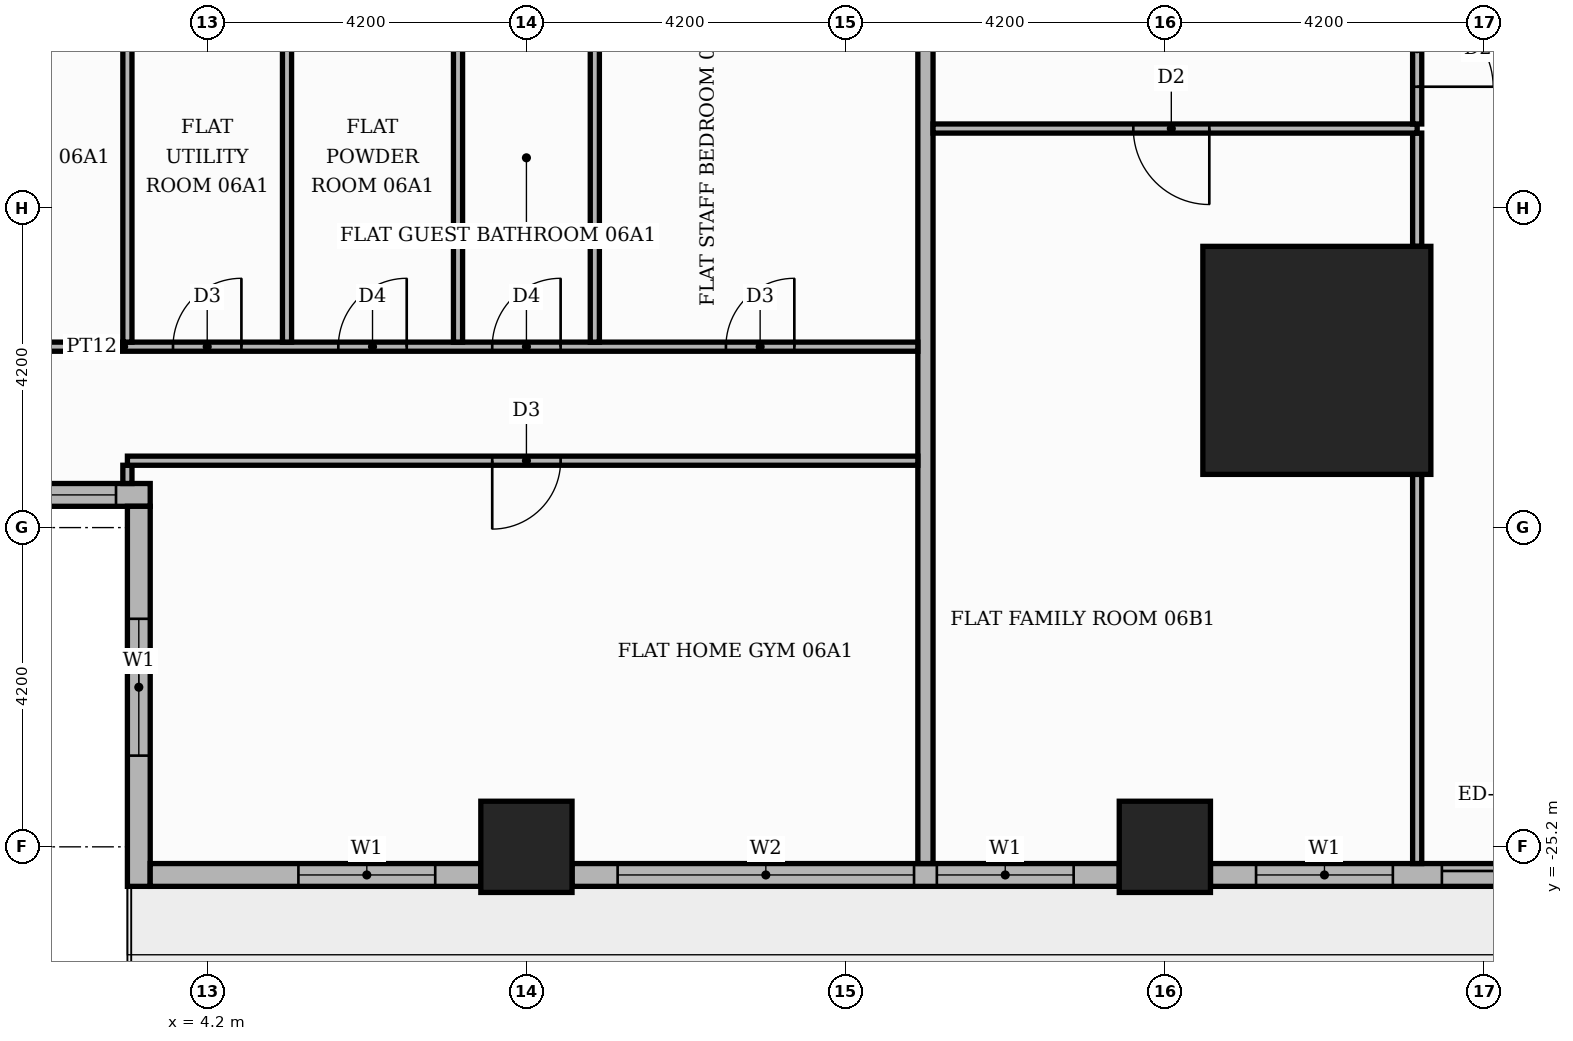
"""IFC4 building model, lengths in metres.
Left out: names, types, materials, properties, quantities, classifications, styles, units other than length and angle.
Written with IfcOpenShell. Run it as: python <this file> out.ifc"""

import sys

from ifc_helpers import new_model, si_unit, direction, frame, frame_2d, origin, origin_2d, place, context, subcontext, project, spatial, rectangle, extrude, element, fill, save


model = new_model("IFC4")
c1 = context("Model", 3, precision=1e-05, world=origin(), true_north=direction((0.0, 1.0)))
c2 = subcontext(c1, "Body", "Model", "MODEL_VIEW")
j1 = project(units=[si_unit("LENGTHUNIT", "METRE"), si_unit("PLANEANGLEUNIT", "RADIAN")], contexts=[c1])
p1 = place(None, origin())
s1 = spatial("IfcSite", under=j1, at=p1, CompositionType="ELEMENT")
p2 = place(p1, origin())
s2 = spatial("IfcBuilding", under=s1, at=p2, CompositionType="ELEMENT")
p3 = place(p2, frame((0.0, 0.0, 30.9)))
s3 = spatial("IfcBuildingStorey", under=s2, at=p3, CompositionType="ELEMENT", Elevation=30.9)
p4 = place(p3, frame((18.8, -18.8, 0.0), z_axis=(0.0, 0.0, 1.0), x_axis=(1.0, 0.0, 0.0)))
e1 = element("IfcColumn", 1, at=p4, inside=s3, PredefinedType="COLUMN", context=c2, shape_type="SweptSolid", body=[
    extrude(rectangle(XDim=3.0, YDim=3.0, at=origin_2d()), origin(), (0.0, 0.0, 1.0), 3.9),
])
for number, where, z_axis, x_axis in (
    (2, (8.4, -25.2, 0.0), (0.0, 0.0, 1.0), (1.0, 0.0, 0.0)),
    (3, (16.8, -25.2, 0.0), (0.0, 0.0, 1.0), (1.0, 0.0, 0.0)),
):
    element("IfcColumn", number, at=place(p3, frame(where, z_axis=z_axis, x_axis=x_axis)), inside=s3, PredefinedType="COLUMN", context=c2, shape_type="SweptSolid", body=[
        extrude(rectangle(XDim=1.2, YDim=1.2, at=origin_2d()), origin(), (0.0, 0.0, 1.0), 3.9),
    ])
p5 = place(p3, frame((-3.15, -20.57, 0.0), z_axis=(0.0, 0.0, 1.0), x_axis=(1.0, 0.0, 0.0)))
e4 = element("IfcWall", 4, at=p5, inside=s3, PredefinedType="STANDARD", context=c2, shape_type="SweptSolid", body=[
    extrude(rectangle(XDim=6.6, YDim=0.3, at=frame_2d((3.3, 0.0))), origin(), (0.0, 0.0, 1.0), 3.48),
])
p6 = place(p5, frame((0.15, 0.0, 0.9)))
e5 = element("IfcOpeningElement", 5, at=p6, cuts=e4, PredefinedType="OPENING", context=c2, shape_type="SweptSolid", body=[
    extrude(rectangle(XDim=6.0, YDim=2.1, at=frame_2d((3.0, 1.05))), frame((0.0, 0.16, 0.0), z_axis=(0.0, -1.0, 0.0), x_axis=(1.0, 0.0, 0.0)), (0.0, 0.0, 1.0), 0.32),
])
p7 = place(p3, frame((3.3, -20.72, 0.0), z_axis=(0.0, 0.0, 1.0), x_axis=(0.0, -1.0, 0.0)))
e6 = element("IfcWall", 6, at=p7, inside=s3, PredefinedType="STANDARD", context=c2, shape_type="SweptSolid", body=[
    extrude(rectangle(XDim=5.0, YDim=0.3, at=frame_2d((2.5, 0.0))), origin(), (0.0, 0.0, 1.0), 3.48),
])
p8 = place(p7, frame((1.48, 0.0, 0.9)))
e7 = element("IfcOpeningElement", 7, at=p8, cuts=e6, PredefinedType="OPENING", context=c2, shape_type="SweptSolid", body=[
    extrude(rectangle(XDim=1.8, YDim=2.1, at=frame_2d((0.9, 1.05))), frame((0.0, 0.16, 0.0), z_axis=(0.0, -1.0, 0.0), x_axis=(1.0, 0.0, 0.0)), (0.0, 0.0, 1.0), 0.32),
])
p9 = place(p3, frame((3.45, -25.57, 0.0), z_axis=(0.0, 0.0, 1.0), x_axis=(1.0, 0.0, 0.0)))
e8 = element("IfcWall", 8, at=p9, inside=s3, PredefinedType="STANDARD", context=c2, shape_type="SweptSolid", body=[
    extrude(rectangle(XDim=4.35, YDim=0.3, at=frame_2d((2.175, 0.0))), origin(), (0.0, 0.0, 1.0), 3.48),
])
p10 = place(p9, frame((1.95, 0.0, 0.9)))
e9 = element("IfcOpeningElement", 9, at=p10, cuts=e8, PredefinedType="OPENING", context=c2, shape_type="SweptSolid", body=[
    extrude(rectangle(XDim=1.8, YDim=2.1, at=frame_2d((0.9, 1.05))), frame((0.0, 0.16, 0.0), z_axis=(0.0, -1.0, 0.0), x_axis=(1.0, 0.0, 0.0)), (0.0, 0.0, 1.0), 0.32),
])
p11 = place(p3, frame((9.0, -25.57, 0.0), z_axis=(0.0, 0.0, 1.0), x_axis=(1.0, 0.0, 0.0)))
e10 = element("IfcWall", 10, at=p11, inside=s3, PredefinedType="STANDARD", context=c2, shape_type="SweptSolid", body=[
    extrude(rectangle(XDim=7.2, YDim=0.3, at=frame_2d((3.6, 0.0))), origin(), (0.0, 0.0, 1.0), 3.48),
])
p12 = place(p11, frame((0.6, 0.0, 0.9)))
e11 = element("IfcOpeningElement", 11, at=p12, cuts=e10, PredefinedType="OPENING", context=c2, shape_type="SweptSolid", body=[
    extrude(rectangle(XDim=3.9, YDim=2.1, at=frame_2d((1.95, 1.05))), frame((0.0, 0.16, 0.0), z_axis=(0.0, -1.0, 0.0), x_axis=(1.0, 0.0, 0.0)), (0.0, 0.0, 1.0), 0.32),
])
p13 = place(p11, frame((4.8, 0.0, 0.9)))
e12 = element("IfcOpeningElement", 12, at=p13, cuts=e10, PredefinedType="OPENING", context=c2, shape_type="SweptSolid", body=[
    extrude(rectangle(XDim=1.8, YDim=2.1, at=frame_2d((0.9, 1.05))), frame((0.0, 0.16, 0.0), z_axis=(0.0, -1.0, 0.0), x_axis=(1.0, 0.0, 0.0)), (0.0, 0.0, 1.0), 0.32),
])
p14 = place(p3, frame((17.4, -25.57, 0.0), z_axis=(0.0, 0.0, 1.0), x_axis=(1.0, 0.0, 0.0)))
e13 = element("IfcWall", 13, at=p14, inside=s3, PredefinedType="STANDARD", context=c2, shape_type="SweptSolid", body=[
    extrude(rectangle(XDim=5.32, YDim=0.3, at=frame_2d((2.66, 0.0))), origin(), (0.0, 0.0, 1.0), 3.48),
])
p15 = place(p14, frame((0.6, 0.0, 0.9)))
e14 = element("IfcOpeningElement", 14, at=p15, cuts=e13, PredefinedType="OPENING", context=c2, shape_type="SweptSolid", body=[
    extrude(rectangle(XDim=1.8, YDim=2.1, at=frame_2d((0.9, 1.05))), frame((0.0, 0.16, 0.0), z_axis=(0.0, -1.0, 0.0), x_axis=(1.0, 0.0, 0.0)), (0.0, 0.0, 1.0), 0.32),
])
p16 = place(p14, frame((3.045, 0.0, 0.0)))
e15 = element("IfcOpeningElement", 15, at=p16, cuts=e13, PredefinedType="OPENING", context=c2, shape_type="SweptSolid", body=[
    extrude(rectangle(XDim=1.8, YDim=2.4, at=frame_2d((0.9, 1.2))), frame((0.0, 0.16, 0.0), z_axis=(0.0, -1.0, 0.0), x_axis=(1.0, 0.0, 0.0)), (0.0, 0.0, 1.0), 0.32),
])
p17 = place(p3, frame((13.65, -25.42, 0.0), z_axis=(0.0, 0.0, 1.0), x_axis=(0.0, 1.0, 0.0)))
e16 = element("IfcWall", 16, at=p17, inside=s3, PredefinedType="PARTITIONING", context=c2, shape_type="SweptSolid", body=[
    extrude(rectangle(XDim=11.67, YDim=0.2, at=frame_2d((5.835, 0.0))), origin(), (0.0, 0.0, 1.0), 3.48),
])
p18 = place(p3, frame((20.12, -25.42, 0.0), z_axis=(0.0, 0.0, 1.0), x_axis=(0.0, 1.0, 0.0)))
e17 = element("IfcWall", 17, at=p18, inside=s3, PredefinedType="PARTITIONING", context=c2, shape_type="SweptSolid", body=[
    extrude(rectangle(XDim=5.12, YDim=0.12, at=frame_2d((2.56, 0.0))), origin(), (0.0, 0.0, 1.0), 3.48),
])
p19 = place(p3, frame((3.15, -20.42, 0.0), z_axis=(0.0, 0.0, 1.0), x_axis=(0.0, 1.0, 0.0)))
e18 = element("IfcWall", 18, at=p19, inside=s3, PredefinedType="PARTITIONING", context=c2, shape_type="SweptSolid", body=[
    extrude(rectangle(XDim=0.24, YDim=0.12, at=frame_2d((0.12, 0.0))), origin(), (0.0, 0.0, 1.0), 3.48),
])
p20 = place(p3, frame((3.15, -20.12, 0.0), z_axis=(0.0, 0.0, 1.0), x_axis=(1.0, 0.0, 0.0)))
e19 = element("IfcWall", 19, at=p20, inside=s3, PredefinedType="PARTITIONING", context=c2, shape_type="SweptSolid", body=[
    extrude(rectangle(XDim=10.4, YDim=0.12, at=frame_2d((5.2, 0.0))), origin(), (0.0, 0.0, 1.0), 3.48),
])
p21 = place(p20, frame((4.8, 0.0, 0.0)))
e20 = element("IfcOpeningElement", 20, at=p21, cuts=e19, PredefinedType="OPENING", context=c2, shape_type="SweptSolid", body=[
    extrude(rectangle(XDim=0.9, YDim=2.1, at=frame_2d((0.45, 1.05))), frame((0.0, 0.07, 0.0), z_axis=(0.0, -1.0, 0.0), x_axis=(1.0, 0.0, 0.0)), (0.0, 0.0, 1.0), 0.14),
])
p22 = place(p3, frame((-7.35, -18.62, 0.0), z_axis=(0.0, 0.0, 1.0), x_axis=(1.0, 0.0, 0.0)))
e21 = element("IfcWall", 21, at=p22, inside=s3, PredefinedType="PARTITIONING", context=c2, shape_type="SweptSolid", body=[
    extrude(rectangle(XDim=20.9, YDim=0.12, at=frame_2d((10.45, 0.0))), origin(), (0.0, 0.0, 1.0), 3.48),
])
p23 = place(p22, frame((2.7, 0.0, 0.0)))
e22 = element("IfcOpeningElement", 22, at=p23, cuts=e21, PredefinedType="OPENING", context=c2, shape_type="SweptSolid", body=[
    extrude(rectangle(XDim=0.9, YDim=2.1, at=frame_2d((0.45, 1.05))), frame((0.0, 0.07, 0.0), z_axis=(0.0, -1.0, 0.0), x_axis=(1.0, 0.0, 0.0)), (0.0, 0.0, 1.0), 0.14),
])
p24 = place(p22, frame((7.95, 0.0, 0.0)))
e23 = element("IfcOpeningElement", 23, at=p24, cuts=e21, PredefinedType="OPENING", context=c2, shape_type="SweptSolid", body=[
    extrude(rectangle(XDim=0.9, YDim=2.1, at=frame_2d((0.45, 1.05))), frame((0.0, 0.07, 0.0), z_axis=(0.0, -1.0, 0.0), x_axis=(1.0, 0.0, 0.0)), (0.0, 0.0, 1.0), 0.14),
])
p25 = place(p22, frame((11.1, 0.0, 0.0)))
e24 = element("IfcOpeningElement", 24, at=p25, cuts=e21, PredefinedType="OPENING", context=c2, shape_type="SweptSolid", body=[
    extrude(rectangle(XDim=0.9, YDim=2.1, at=frame_2d((0.45, 1.05))), frame((0.0, 0.07, 0.0), z_axis=(0.0, -1.0, 0.0), x_axis=(1.0, 0.0, 0.0)), (0.0, 0.0, 1.0), 0.14),
])
p26 = place(p22, frame((13.275, 0.0, 0.0)))
e25 = element("IfcOpeningElement", 25, at=p26, cuts=e21, PredefinedType="OPENING", context=c2, shape_type="SweptSolid", body=[
    extrude(rectangle(XDim=0.9, YDim=2.1, at=frame_2d((0.45, 1.05))), frame((0.0, 0.07, 0.0), z_axis=(0.0, -1.0, 0.0), x_axis=(1.0, 0.0, 0.0)), (0.0, 0.0, 1.0), 0.14),
])
p27 = place(p22, frame((15.3, 0.0, 0.0)))
e26 = element("IfcOpeningElement", 26, at=p27, cuts=e21, PredefinedType="OPENING", context=c2, shape_type="SweptSolid", body=[
    extrude(rectangle(XDim=0.9, YDim=2.1, at=frame_2d((0.45, 1.05))), frame((0.0, 0.07, 0.0), z_axis=(0.0, -1.0, 0.0), x_axis=(1.0, 0.0, 0.0)), (0.0, 0.0, 1.0), 0.14),
])
p28 = place(p22, frame((18.375, 0.0, 0.0)))
e27 = element("IfcOpeningElement", 27, at=p28, cuts=e21, PredefinedType="OPENING", context=c2, shape_type="SweptSolid", body=[
    extrude(rectangle(XDim=0.9, YDim=2.1, at=frame_2d((0.45, 1.05))), frame((0.0, 0.07, 0.0), z_axis=(0.0, -1.0, 0.0), x_axis=(1.0, 0.0, 0.0)), (0.0, 0.0, 1.0), 0.14),
])
for number, where, z_axis, x_axis in (
    (28, (3.15, -18.56, 0.0), (0.0, 0.0, 1.0), (0.0, 1.0, 0.0)),
    (29, (5.25, -18.56, 0.0), (0.0, 0.0, 1.0), (0.0, 1.0, 0.0)),
    (30, (7.5, -18.56, 0.0), (0.0, 0.0, 1.0), (0.0, 1.0, 0.0)),
    (31, (9.3, -18.56, 0.0), (0.0, 0.0, 1.0), (0.0, 1.0, 0.0)),
):
    element("IfcWall", number, at=place(p3, frame(where, z_axis=z_axis, x_axis=x_axis)), inside=s3, PredefinedType="PARTITIONING", context=c2, shape_type="SweptSolid", body=[
        extrude(rectangle(XDim=4.81, YDim=0.12, at=frame_2d((2.405, 0.0))), origin(), (0.0, 0.0, 1.0), 3.48),
    ])
p29 = place(p3, frame((20.12, -17.3, 0.0), z_axis=(0.0, 0.0, 1.0), x_axis=(0.0, 1.0, 0.0)))
e32 = element("IfcWall", 32, at=p29, inside=s3, PredefinedType="PARTITIONING", context=c2, shape_type="SweptSolid", body=[
    extrude(rectangle(XDim=1.49, YDim=0.12, at=frame_2d((0.745, 0.0))), origin(), (0.0, 0.0, 1.0), 3.48),
])
p30 = place(p3, frame((13.75, -15.75, 0.0), z_axis=(0.0, 0.0, 1.0), x_axis=(1.0, 0.0, 0.0)))
e33 = element("IfcWall", 33, at=p30, inside=s3, PredefinedType="PARTITIONING", context=c2, shape_type="SweptSolid", body=[
    extrude(rectangle(XDim=6.37, YDim=0.12, at=frame_2d((3.185, 0.0))), origin(), (0.0, 0.0, 1.0), 3.48),
])
p31 = place(p30, frame((2.635, 0.0, 0.0)))
e34 = element("IfcOpeningElement", 34, at=p31, cuts=e33, PredefinedType="OPENING", context=c2, shape_type="SweptSolid", body=[
    extrude(rectangle(XDim=1.0, YDim=2.1, at=frame_2d((0.5, 1.05))), frame((0.0, 0.07, 0.0), z_axis=(0.0, -1.0, 0.0), x_axis=(1.0, 0.0, 0.0)), (0.0, 0.0, 1.0), 0.14),
])
p32 = place(p3, frame((20.12, -15.69, 0.0), z_axis=(0.0, 0.0, 1.0), x_axis=(0.0, 1.0, 0.0)))
e35 = element("IfcWall", 35, at=p32, inside=s3, PredefinedType="PARTITIONING", context=c2, shape_type="SweptSolid", body=[
    extrude(rectangle(XDim=1.98, YDim=0.12, at=frame_2d((0.99, 0.0))), origin(), (0.0, 0.0, 1.0), 3.48),
])
p33 = place(p32, frame((0.49, 0.0, 0.0)))
e36 = element("IfcOpeningElement", 36, at=p33, cuts=e35, PredefinedType="OPENING", context=c2, shape_type="SweptSolid", body=[
    extrude(rectangle(XDim=1.0, YDim=2.1, at=frame_2d((0.5, 1.05))), frame((0.0, 0.07, 0.0), z_axis=(0.0, -1.0, 0.0), x_axis=(1.0, 0.0, 0.0)), (0.0, 0.0, 1.0), 0.14),
])
p34 = place(p6, origin())
e37 = element("IfcWindow", 37, at=p34, inside=s3, PartitioningType="SINGLE_PANEL", PredefinedType="WINDOW", context=c2, shape_type="SweptSolid", body=[
    extrude(rectangle(XDim=6.0, YDim=2.1, at=frame_2d((3.0, 1.05))), frame((0.0, 0.03, 0.0), z_axis=(0.0, -1.0, 0.0), x_axis=(1.0, 0.0, 0.0)), (0.0, 0.0, 1.0), 0.06),
])
fill(e5, e37)
p35 = place(p8, origin())
e38 = element("IfcWindow", 38, at=p35, inside=s3, PartitioningType="SINGLE_PANEL", PredefinedType="WINDOW", context=c2, shape_type="SweptSolid", body=[
    extrude(rectangle(XDim=1.8, YDim=2.1, at=frame_2d((0.9, 1.05))), frame((0.0, 0.03, 0.0), z_axis=(0.0, -1.0, 0.0), x_axis=(1.0, 0.0, 0.0)), (0.0, 0.0, 1.0), 0.06),
])
fill(e7, e38)
p36 = place(p10, origin())
e39 = element("IfcWindow", 39, at=p36, inside=s3, PartitioningType="SINGLE_PANEL", PredefinedType="WINDOW", context=c2, shape_type="SweptSolid", body=[
    extrude(rectangle(XDim=1.8, YDim=2.1, at=frame_2d((0.9, 1.05))), frame((0.0, 0.03, 0.0), z_axis=(0.0, -1.0, 0.0), x_axis=(1.0, 0.0, 0.0)), (0.0, 0.0, 1.0), 0.06),
])
fill(e9, e39)
p37 = place(p12, origin())
e40 = element("IfcWindow", 40, at=p37, inside=s3, PartitioningType="SINGLE_PANEL", PredefinedType="WINDOW", context=c2, shape_type="SweptSolid", body=[
    extrude(rectangle(XDim=3.9, YDim=2.1, at=frame_2d((1.95, 1.05))), frame((0.0, 0.03, 0.0), z_axis=(0.0, -1.0, 0.0), x_axis=(1.0, 0.0, 0.0)), (0.0, 0.0, 1.0), 0.06),
])
fill(e11, e40)
p38 = place(p13, origin())
e41 = element("IfcWindow", 41, at=p38, inside=s3, PartitioningType="SINGLE_PANEL", PredefinedType="WINDOW", context=c2, shape_type="SweptSolid", body=[
    extrude(rectangle(XDim=1.8, YDim=2.1, at=frame_2d((0.9, 1.05))), frame((0.0, 0.03, 0.0), z_axis=(0.0, -1.0, 0.0), x_axis=(1.0, 0.0, 0.0)), (0.0, 0.0, 1.0), 0.06),
])
fill(e12, e41)
p39 = place(p15, origin())
e42 = element("IfcWindow", 42, at=p39, inside=s3, PartitioningType="SINGLE_PANEL", PredefinedType="WINDOW", context=c2, shape_type="SweptSolid", body=[
    extrude(rectangle(XDim=1.8, YDim=2.1, at=frame_2d((0.9, 1.05))), frame((0.0, 0.03, 0.0), z_axis=(0.0, -1.0, 0.0), x_axis=(1.0, 0.0, 0.0)), (0.0, 0.0, 1.0), 0.06),
])
fill(e14, e42)
p40 = place(p16, origin())
e43 = element("IfcDoor", 43, at=p40, inside=s3, OperationType="SLIDING_TO_RIGHT", PredefinedType="DOOR", context=c2, shape_type="SweptSolid", body=[
    extrude(rectangle(XDim=1.8, YDim=2.4, at=frame_2d((0.9, 1.2))), frame((0.0, 0.025, 0.0), z_axis=(0.0, -1.0, 0.0), x_axis=(1.0, 0.0, 0.0)), (0.0, 0.0, 1.0), 0.05),
])
fill(e15, e43)
p41 = place(p25, origin())
e44 = element("IfcDoor", 44, at=p41, inside=s3, OperationType="SINGLE_SWING_RIGHT", PredefinedType="DOOR", context=c2, shape_type="SweptSolid", body=[
    extrude(rectangle(XDim=0.9, YDim=2.1, at=frame_2d((0.45, 1.05))), frame((0.0, 0.025, 0.0), z_axis=(0.0, -1.0, 0.0), x_axis=(1.0, 0.0, 0.0)), (0.0, 0.0, 1.0), 0.05),
])
fill(e24, e44)
p42 = place(p26, origin())
e45 = element("IfcDoor", 45, at=p42, inside=s3, OperationType="SINGLE_SWING_RIGHT", PredefinedType="DOOR", context=c2, shape_type="SweptSolid", body=[
    extrude(rectangle(XDim=0.9, YDim=2.1, at=frame_2d((0.45, 1.05))), frame((0.0, 0.025, 0.0), z_axis=(0.0, -1.0, 0.0), x_axis=(1.0, 0.0, 0.0)), (0.0, 0.0, 1.0), 0.05),
])
fill(e25, e45)
p43 = place(p27, origin())
e46 = element("IfcDoor", 46, at=p43, inside=s3, OperationType="SINGLE_SWING_RIGHT", PredefinedType="DOOR", context=c2, shape_type="SweptSolid", body=[
    extrude(rectangle(XDim=0.9, YDim=2.1, at=frame_2d((0.45, 1.05))), frame((0.0, 0.025, 0.0), z_axis=(0.0, -1.0, 0.0), x_axis=(1.0, 0.0, 0.0)), (0.0, 0.0, 1.0), 0.05),
])
fill(e26, e46)
p44 = place(p28, origin())
e47 = element("IfcDoor", 47, at=p44, inside=s3, OperationType="SINGLE_SWING_RIGHT", PredefinedType="DOOR", context=c2, shape_type="SweptSolid", body=[
    extrude(rectangle(XDim=0.9, YDim=2.1, at=frame_2d((0.45, 1.05))), frame((0.0, 0.025, 0.0), z_axis=(0.0, -1.0, 0.0), x_axis=(1.0, 0.0, 0.0)), (0.0, 0.0, 1.0), 0.05),
])
fill(e27, e47)
p45 = place(p21, frame((0.9, 0.0, 0.0), z_axis=(0.0, 0.0, 1.0), x_axis=(-1.0, 0.0, 0.0)))
e48 = element("IfcDoor", 48, at=p45, inside=s3, OperationType="SINGLE_SWING_LEFT", PredefinedType="DOOR", context=c2, shape_type="SweptSolid", body=[
    extrude(rectangle(XDim=0.9, YDim=2.1, at=frame_2d((0.45, 1.05))), frame((0.0, 0.025, 0.0), z_axis=(0.0, -1.0, 0.0), x_axis=(1.0, 0.0, 0.0)), (0.0, 0.0, 1.0), 0.05),
])
fill(e20, e48)
p46 = place(p31, frame((1.0, 0.0, 0.0), z_axis=(0.0, 0.0, 1.0), x_axis=(-1.0, 0.0, 0.0)))
e49 = element("IfcDoor", 49, at=p46, inside=s3, OperationType="SINGLE_SWING_RIGHT", PredefinedType="DOOR", context=c2, shape_type="SweptSolid", body=[
    extrude(rectangle(XDim=1.0, YDim=2.1, at=frame_2d((0.5, 1.05))), frame((0.0, 0.025, 0.0), z_axis=(0.0, -1.0, 0.0), x_axis=(1.0, 0.0, 0.0)), (0.0, 0.0, 1.0), 0.05),
])
fill(e34, e49)
p47 = place(p33, frame((1.0, 0.0, 0.0), z_axis=(0.0, 0.0, 1.0), x_axis=(-1.0, 0.0, 0.0)))
e50 = element("IfcDoor", 50, at=p47, inside=s3, OperationType="SINGLE_SWING_LEFT", PredefinedType="DOOR", context=c2, shape_type="SweptSolid", body=[
    extrude(rectangle(XDim=1.0, YDim=2.1, at=frame_2d((0.5, 1.05))), frame((0.0, 0.025, 0.0), z_axis=(0.0, -1.0, 0.0), x_axis=(1.0, 0.0, 0.0)), (0.0, 0.0, 1.0), 0.05),
])
fill(e36, e50)
save(model, sys.argv[1])
